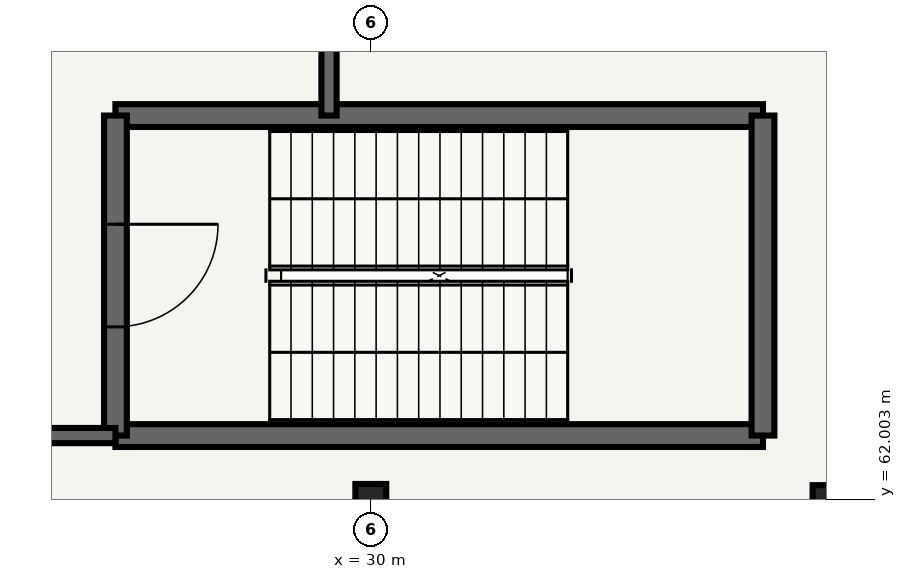
"""IFC4 building model, lengths in metres.
Left out: names, types, materials, properties, quantities, classifications, styles, units other than length and angle.
Written with IfcOpenShell. Run it as: python <this file> out.ifc"""

import sys

from ifc_helpers import new_model, si_unit, direction, frame, frame_2d, origin, origin_2d, place, context, subcontext, project, spatial, rectangle, hollow_circle, i_section, extrude, element, fill, save


model = new_model("IFC4")
c1 = context("Model", 3, precision=1e-05, world=origin(), true_north=direction((0.0, 1.0)))
c2 = subcontext(c1, "Body", "Model", "MODEL_VIEW")
j1 = project(units=[si_unit("LENGTHUNIT", "METRE"), si_unit("PLANEANGLEUNIT", "RADIAN")], contexts=[c1])
p1 = place(None, origin())
s1 = spatial("IfcSite", under=j1, at=p1, CompositionType="ELEMENT")
p2 = place(p1, origin())
s2 = spatial("IfcBuilding", under=s1, at=p2, CompositionType="ELEMENT")
p3 = place(p2, origin())
s3 = spatial("IfcBuildingStorey", under=s2, at=p3, CompositionType="ELEMENT", Elevation=0.0)
p4 = place(p3, frame((30.0, 62.0, -5.8), z_axis=(0.0, 0.0, 1.0), x_axis=(1.0, 0.0, 0.0)))
e1 = element("IfcColumn", 1, at=p4, inside=s3, PredefinedType="COLUMN", context=c2, shape_type="SweptSolid", body=[
    extrude(hollow_circle(Radius=0.203, WallThickness=0.016, at=origin_2d()), origin(), (0.0, 0.0, 1.0), 11.2),
])
p5 = place(p3, frame((36.0, 62.0, 0.0), z_axis=(0.0, 0.0, 1.0), x_axis=(1.0, 0.0, 0.0)))
e2 = element("IfcColumn", 2, at=p5, inside=s3, PredefinedType="COLUMN", context=c2, shape_type="SweptSolid", body=[
    extrude(i_section(OverallWidth=0.375, OverallDepth=0.375, WebThickness=0.017, FlangeThickness=0.027, FilletRadius=0.015, at=origin_2d()), origin(), (0.0, 0.0, 1.0), 5.4),
])
for number, where, z_axis, x_axis in (
    (3, (26.64, 62.84, 0.0), (0.0, 0.0, 1.0), (1.0, 0.0, 0.0)),
    (4, (35.16, 67.05, 0.0), (0.0, 0.0, 1.0), (-1.0, 0.0, 0.0)),
):
    element("IfcWall", number, at=place(p3, frame(where, z_axis=z_axis, x_axis=x_axis)), inside=s3, PredefinedType="SHEAR", context=c2, shape_type="SweptSolid", body=[
        extrude(rectangle(XDim=8.52, YDim=0.3, at=frame_2d((4.26, 0.0))), origin(), (0.0, 0.0, 1.0), 5.15),
    ])
p6 = place(p3, frame((26.64, 67.05, 0.0), z_axis=(0.0, 0.0, 1.0), x_axis=(0.0, -1.0, 0.0)))
e5 = element("IfcWall", 5, at=p6, inside=s3, PredefinedType="SHEAR", context=c2, shape_type="SweptSolid", body=[
    extrude(rectangle(XDim=4.21, YDim=0.3, at=frame_2d((2.105, 0.0))), origin(), (0.0, 0.0, 1.0), 5.15),
])
p7 = place(p6, frame((1.43, 0.0, 0.0)))
e6 = element("IfcOpeningElement", 6, at=p7, cuts=e5, PredefinedType="OPENING", context=c2, shape_type="SweptSolid", body=[
    extrude(rectangle(XDim=1.35, YDim=2.2, at=frame_2d((0.675, 1.1))), frame((0.0, 0.16, 0.0), z_axis=(0.0, -1.0, 0.0), x_axis=(1.0, 0.0, 0.0)), (0.0, 0.0, 1.0), 0.32),
])
p8 = place(p3, frame((35.16, 62.84, 0.0), z_axis=(0.0, 0.0, 1.0), x_axis=(0.0, 1.0, 0.0)))
e7 = element("IfcWall", 7, at=p8, inside=s3, PredefinedType="SHEAR", context=c2, shape_type="SweptSolid", body=[
    extrude(rectangle(XDim=4.21, YDim=0.3, at=frame_2d((2.105, 0.0))), origin(), (0.0, 0.0, 1.0), 5.15),
])
p9 = place(p3, frame((22.8, 62.84, 0.0), z_axis=(0.0, 0.0, 1.0), x_axis=(1.0, 0.0, 0.0)))
e8 = element("IfcWall", 8, at=p9, inside=s3, PredefinedType="SHEAR", context=c2, shape_type="SweptSolid", body=[
    extrude(rectangle(XDim=3.84, YDim=0.2, at=frame_2d((1.92, 0.0))), origin(), (0.0, 0.0, 1.0), 5.15),
])
p10 = place(p9, frame((1.145, 0.0, 0.0)))
e9 = element("IfcOpeningElement", 9, at=p10, cuts=e8, PredefinedType="OPENING", context=c2, shape_type="SweptSolid", body=[
    extrude(rectangle(XDim=1.55, YDim=2.2, at=frame_2d((0.775, 1.1))), frame((0.0, 0.11, 0.0), z_axis=(0.0, -1.0, 0.0), x_axis=(1.0, 0.0, 0.0)), (0.0, 0.0, 1.0), 0.22),
])
p11 = place(p3, frame((29.45, 67.05, 0.0), z_axis=(0.0, 0.0, 1.0), x_axis=(0.0, 1.0, 0.0)))
e10 = element("IfcWall", 10, at=p11, inside=s3, PredefinedType="SHEAR", context=c2, shape_type="SweptSolid", body=[
    extrude(rectangle(XDim=13.5, YDim=0.2, at=frame_2d((6.75, 0.0))), origin(), (0.0, 0.0, 1.0), 5.15),
])
p12 = place(p7, origin())
e11 = element("IfcDoor", 11, at=p12, inside=s3, OperationType="SINGLE_SWING_LEFT", PredefinedType="DOOR", context=c2, shape_type="SweptSolid", body=[
    extrude(rectangle(XDim=1.35, YDim=2.2, at=frame_2d((0.675, 1.1))), frame((0.0, 0.025, 0.0), z_axis=(0.0, -1.0, 0.0), x_axis=(1.0, 0.0, 0.0)), (0.0, 0.0, 1.0), 0.05),
])
fill(e6, e11)
save(model, sys.argv[1])
